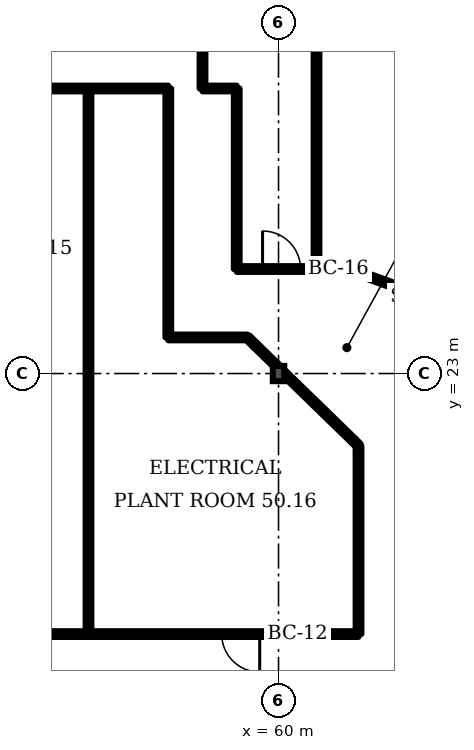
"""IFC4 building model, lengths in metres.
Left out: names, types, materials, properties, quantities, classifications, styles, units other than length and angle.
Written with IfcOpenShell. Run it as: python <this file> out.ifc"""

import sys

from ifc_helpers import new_model, si_unit, direction, frame, frame_2d, origin, origin_2d, place, context, subcontext, project, spatial, rectangle, i_section, extrude, element, fill, save


model = new_model("IFC4")
c1 = context("Model", 3, precision=1e-05, world=origin(), true_north=direction((0.0, 1.0)))
c2 = subcontext(c1, "Body", "Model", "MODEL_VIEW")
j1 = project(units=[si_unit("LENGTHUNIT", "METRE"), si_unit("PLANEANGLEUNIT", "RADIAN")], contexts=[c1])
p1 = place(None, origin())
s1 = spatial("IfcSite", under=j1, at=p1, CompositionType="ELEMENT")
p2 = place(p1, origin())
s2 = spatial("IfcBuilding", under=s1, at=p2, CompositionType="ELEMENT")
p3 = place(p2, frame((0.0, 0.0, 202.3)))
s3 = spatial("IfcBuildingStorey", under=s2, at=p3, CompositionType="ELEMENT", Elevation=202.3)
p4 = place(p3, frame((60.0, 23.0, 0.0), z_axis=(0.0, 0.0, 1.0), x_axis=(1.0, 0.0, 0.0)))
e1 = element("IfcColumn", 1, at=p4, inside=s3, PredefinedType="COLUMN", context=c2, shape_type="SweptSolid", body=[
    extrude(i_section(OverallWidth=0.3, OverallDepth=0.4, WebThickness=0.013, FlangeThickness=0.024, FilletRadius=0.027, at=origin_2d()), origin(), (0.0, 0.0, 1.0), 4.8),
])
p5 = place(p3, frame((24.8, 16.145, 0.0), z_axis=(0.0, 0.0, 1.0), x_axis=(1.0, 0.0, 0.0)))
e2 = element("IfcWall", 2, at=p5, inside=s3, PredefinedType="PARTITIONING", context=c2, shape_type="SweptSolid", body=[
    extrude(rectangle(XDim=37.305, YDim=0.15, at=frame_2d((18.652, 0.0))), origin(), (0.0, 0.0, 1.0), 4.4),
])
p6 = place(p5, frame((23.78, 0.0, 0.0)))
e3 = element("IfcOpeningElement", 3, at=p6, cuts=e2, PredefinedType="OPENING", context=c2, shape_type="SweptSolid", body=[
    extrude(rectangle(XDim=1.0, YDim=2.1, at=frame_2d((0.5, 1.05))), frame((0.0, 0.085, 0.0), z_axis=(0.0, -1.0, 0.0), x_axis=(1.0, 0.0, 0.0)), (0.0, 0.0, 1.0), 0.17),
])
p7 = place(p5, frame((33.705, 0.0, 0.0)))
e4 = element("IfcOpeningElement", 4, at=p7, cuts=e2, PredefinedType="OPENING", context=c2, shape_type="SweptSolid", body=[
    extrude(rectangle(XDim=1.0, YDim=2.1, at=frame_2d((0.5, 1.05))), frame((0.0, 0.085, 0.0), z_axis=(0.0, -1.0, 0.0), x_axis=(1.0, 0.0, 0.0)), (0.0, 0.0, 1.0), 0.17),
])
p8 = place(p3, frame((55.0, 16.145, 0.0), z_axis=(0.0, 0.0, 1.0), x_axis=(0.0, 1.0, 0.0)))
e5 = element("IfcWall", 5, at=p8, inside=s3, PredefinedType="PARTITIONING", context=c2, shape_type="SweptSolid", body=[
    extrude(rectangle(XDim=14.355, YDim=0.15, at=frame_2d((7.177, 0.0))), origin(), (0.0, 0.0, 1.0), 4.4),
])
p9 = place(p3, frame((57.1, 23.95, 0.0), z_axis=(0.0, 0.0, 1.0), x_axis=(0.0, 1.0, 0.0)))
e6 = element("IfcWall", 6, at=p9, inside=s3, PredefinedType="PARTITIONING", context=c2, shape_type="SweptSolid", body=[
    extrude(rectangle(XDim=6.55, YDim=0.15, at=frame_2d((3.275, 0.0))), origin(), (0.0, 0.0, 1.0), 4.4),
])
p10 = place(p3, frame((57.1, 23.95, 0.0), z_axis=(0.0, 0.0, 1.0), x_axis=(1.0, 0.0, 0.0)))
e7 = element("IfcWall", 7, at=p10, inside=s3, PredefinedType="PARTITIONING", context=c2, shape_type="SweptSolid", body=[
    extrude(rectangle(XDim=2.08, YDim=0.15, at=frame_2d((1.04, 0.0))), origin(), (0.0, 0.0, 1.0), 4.4),
])
p11 = place(p3, frame((58.0, 30.5, 0.0), z_axis=(0.0, 0.0, 1.0), x_axis=(0.0, 1.0, 0.0)))
e8 = element("IfcWall", 8, at=p11, inside=s3, PredefinedType="PARTITIONING", context=c2, shape_type="SweptSolid", body=[
    extrude(rectangle(XDim=3.48, YDim=0.15, at=frame_2d((1.74, 0.0))), origin(), (0.0, 0.0, 1.0), 4.4),
])
p12 = place(p3, frame((58.0, 30.5, 0.0), z_axis=(0.0, 0.0, 1.0), x_axis=(1.0, 0.0, 0.0)))
e9 = element("IfcWall", 9, at=p12, inside=s3, PredefinedType="PARTITIONING", context=c2, shape_type="SweptSolid", body=[
    extrude(rectangle(XDim=0.9, YDim=0.15, at=frame_2d((0.45, 0.0))), origin(), (0.0, 0.0, 1.0), 4.4),
])
p13 = place(p3, frame((58.9, 25.75, 0.0), z_axis=(0.0, 0.0, 1.0), x_axis=(0.0, 1.0, 0.0)))
e10 = element("IfcWall", 10, at=p13, inside=s3, PredefinedType="PARTITIONING", context=c2, shape_type="SweptSolid", body=[
    extrude(rectangle(XDim=4.75, YDim=0.15, at=frame_2d((2.375, 0.0))), origin(), (0.0, 0.0, 1.0), 4.4),
])
p14 = place(p3, frame((58.9, 25.75, 0.0), z_axis=(0.0, 0.0, 1.0), x_axis=(1.0, 0.0, 0.0)))
e11 = element("IfcWall", 11, at=p14, inside=s3, PredefinedType="PARTITIONING", context=c2, shape_type="SweptSolid", body=[
    extrude(rectangle(XDim=3.205, YDim=0.15, at=frame_2d((1.603, 0.0))), origin(), (0.0, 0.0, 1.0), 4.4),
])
p15 = place(p14, frame((0.68, 0.0, 0.0)))
e12 = element("IfcOpeningElement", 12, at=p15, cuts=e11, PredefinedType="OPENING", context=c2, shape_type="SweptSolid", body=[
    extrude(rectangle(XDim=1.0, YDim=2.1, at=frame_2d((0.5, 1.05))), frame((0.0, 0.085, 0.0), z_axis=(0.0, -1.0, 0.0), x_axis=(1.0, 0.0, 0.0)), (0.0, 0.0, 1.0), 0.17),
])
p16 = place(p3, frame((59.395, 23.74, 0.0), z_axis=(0.0, 0.0, 1.0), x_axis=(-0.715582, 0.698525, 0.0)))
e13 = element("IfcWall", 13, at=p16, inside=s3, PredefinedType="PARTITIONING", context=c2, shape_type="SweptSolid", body=[
    extrude(rectangle(XDim=0.301, YDim=0.15, at=frame_2d((0.15, 0.0))), origin(), (0.0, 0.0, 1.0), 4.4),
])
p17 = place(p3, frame((61.0, 25.75, 0.0), z_axis=(0.0, 0.0, 1.0), x_axis=(0.0, 1.0, 0.0)))
e14 = element("IfcWall", 14, at=p17, inside=s3, PredefinedType="PARTITIONING", context=c2, shape_type="SweptSolid", body=[
    extrude(rectangle(XDim=16.23, YDim=0.15, at=frame_2d((8.115, 0.0))), origin(), (0.0, 0.0, 1.0), 4.4),
])
p18 = place(p17, frame((7.62, 0.0, 0.0)))
e15 = element("IfcOpeningElement", 15, at=p18, cuts=e14, PredefinedType="OPENING", context=c2, shape_type="SweptSolid", body=[
    extrude(rectangle(XDim=1.0, YDim=2.1, at=frame_2d((0.5, 1.05))), frame((0.0, 0.085, 0.0), z_axis=(0.0, -1.0, 0.0), x_axis=(1.0, 0.0, 0.0)), (0.0, 0.0, 1.0), 0.17),
])
p19 = place(p3, frame((61.97, 21.235, 0.0), z_axis=(0.0, 0.0, 1.0), x_axis=(-0.716792, 0.697287, 0.0)))
e16 = element("IfcWall", 16, at=p19, inside=s3, PredefinedType="PARTITIONING", context=c2, shape_type="SweptSolid", body=[
    extrude(rectangle(XDim=3.592, YDim=0.15, at=frame_2d((1.796, 0.0))), origin(), (0.0, 0.0, 1.0), 4.4),
])
p20 = place(p3, frame((62.105, 21.1, 0.0), z_axis=(0.0, 0.0, 1.0), x_axis=(-0.707107, 0.707107, 0.0)))
e17 = element("IfcWall", 17, at=p20, inside=s3, PredefinedType="PARTITIONING", context=c2, shape_type="SweptSolid", body=[
    extrude(rectangle(XDim=0.191, YDim=0.15, at=frame_2d((0.095, 0.0))), origin(), (0.0, 0.0, 1.0), 4.4),
])
p21 = place(p3, frame((62.105, 16.145, 0.0), z_axis=(0.0, 0.0, 1.0), x_axis=(0.0, 1.0, 0.0)))
e18 = element("IfcWall", 18, at=p21, inside=s3, PredefinedType="PARTITIONING", context=c2, shape_type="SweptSolid", body=[
    extrude(rectangle(XDim=4.955, YDim=0.15, at=frame_2d((2.478, 0.0))), origin(), (0.0, 0.0, 1.0), 4.4),
])
p22 = place(p3, frame((62.185, 25.62, 0.0), z_axis=(0.0, 0.0, 1.0), x_axis=(-0.524813, 0.851221, 0.0)))
e19 = element("IfcWall", 19, at=p22, inside=s3, PredefinedType="PARTITIONING", context=c2, shape_type="SweptSolid", body=[
    extrude(rectangle(XDim=0.153, YDim=0.15, at=frame_2d((0.076, 0.0))), origin(), (0.0, 0.0, 1.0), 4.4),
])
p23 = place(p3, frame((62.755, 25.415, 0.0), z_axis=(0.0, 0.0, 1.0), x_axis=(-0.940583, 0.339576, 0.0)))
e20 = element("IfcWall", 20, at=p23, inside=s3, PredefinedType="PARTITIONING", context=c2, shape_type="SweptSolid", body=[
    extrude(rectangle(XDim=0.515, YDim=0.15, at=frame_2d((0.258, 0.0))), origin(), (0.0, 0.0, 1.0), 4.4),
])
p24 = place(p3, frame((63.12, 25.28, 0.0), z_axis=(0.0, 0.0, 1.0), x_axis=(-0.937965, 0.346721, 0.0)))
e21 = element("IfcWall", 21, at=p24, inside=s3, PredefinedType="PARTITIONING", context=c2, shape_type="SweptSolid", body=[
    extrude(rectangle(XDim=0.389, YDim=0.15, at=frame_2d((0.195, 0.0))), origin(), (0.0, 0.0, 1.0), 4.4),
])
p25 = place(p3, frame((44.15, 30.5, 0.0), z_axis=(0.0, 0.0, 1.0), x_axis=(1.0, 0.0, 0.0)))
e22 = element("IfcWall", 22, at=p25, inside=s3, PredefinedType="PARTITIONING", context=c2, shape_type="SweptSolid", body=[
    extrude(rectangle(XDim=12.95, YDim=0.15, at=frame_2d((6.475, 0.0))), origin(), (0.0, 0.0, 1.0), 4.4),
])
p26 = place(p7, origin())
e23 = element("IfcDoor", 23, at=p26, inside=s3, OperationType="SINGLE_SWING_RIGHT", PredefinedType="DOOR", context=c2, shape_type="SweptSolid", body=[
    extrude(rectangle(XDim=1.0, YDim=2.1, at=frame_2d((0.5, 1.05))), frame((0.0, 0.025, 0.0), z_axis=(0.0, -1.0, 0.0), x_axis=(1.0, 0.0, 0.0)), (0.0, 0.0, 1.0), 0.05),
])
fill(e4, e23)
p27 = place(p15, origin())
e24 = element("IfcDoor", 24, at=p27, inside=s3, OperationType="SINGLE_SWING_LEFT", PredefinedType="DOOR", context=c2, shape_type="SweptSolid", body=[
    extrude(rectangle(XDim=1.0, YDim=2.1, at=frame_2d((0.5, 1.05))), frame((0.0, 0.025, 0.0), z_axis=(0.0, -1.0, 0.0), x_axis=(1.0, 0.0, 0.0)), (0.0, 0.0, 1.0), 0.05),
])
fill(e12, e24)
save(model, sys.argv[1])
